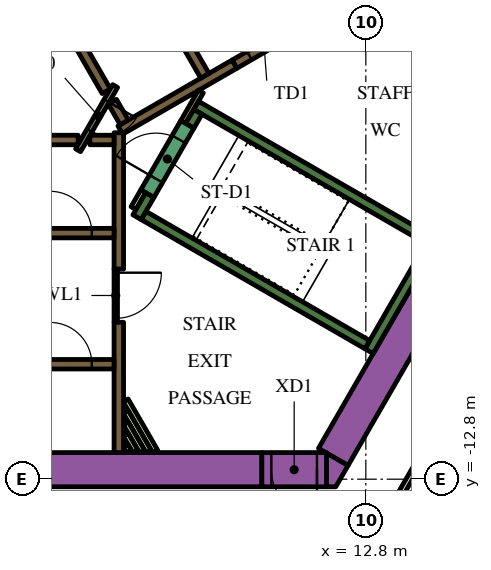
"""IFC4 building model, lengths in metres.
Left out: names, types, materials, properties, quantities, classifications, styles, units other than length and angle.
Written with IfcOpenShell. Run it as: python <this file> out.ifc"""

import sys

from ifc_helpers import new_model, si_unit, direction, frame, frame_2d, origin, place, context, subcontext, project, spatial, polyline, rectangle, outline, extrude, element, fill, save


model = new_model("IFC4")
c1 = context("Model", 3, precision=1e-05, world=origin(), true_north=direction((0.0, 1.0)))
c2 = subcontext(c1, "Body", "Model", "MODEL_VIEW")
j1 = project(units=[si_unit("LENGTHUNIT", "METRE"), si_unit("PLANEANGLEUNIT", "RADIAN")], contexts=[c1])
p1 = place(None, origin())
s1 = spatial("IfcSite", under=j1, at=p1, CompositionType="ELEMENT")
p2 = place(p1, origin())
s2 = spatial("IfcBuilding", under=s1, at=p2, CompositionType="ELEMENT")
p3 = place(p2, frame((0.0, 0.0, 122.7)))
s3 = spatial("IfcBuildingStorey", under=s2, at=p3, CompositionType="ELEMENT", Elevation=122.7)
p4 = place(p3, frame((6.776, 13.364, 0.0), z_axis=(0.0, 0.0, 1.0), x_axis=(0.500004177138, -0.8660229921, 0.0)))
e1 = element("IfcWall", 1, at=p4, inside=s3, PredefinedType="SOLIDWALL", context=c2, shape_type="SweptSolid", body=[
    extrude(rectangle(XDim=20.204, YDim=0.9, at=frame_2d((10.102, 0.0))), origin(), (0.0, 0.0, 1.0), 3.9),
])
p5 = place(p3, frame((11.943, -12.214, 0.0), z_axis=(0.0, 0.0, 1.0), x_axis=(0.49998092645, 0.866036415623, 0.0)))
e2 = element("IfcWall", 2, at=p5, inside=s3, PredefinedType="SOLIDWALL", context=c2, shape_type="SweptSolid", body=[
    extrude(rectangle(XDim=8.83, YDim=0.9, at=frame_2d((4.415, 0.0))), origin(), (0.0, 0.0, 1.0), 3.9),
])
p6 = place(p3, origin())
e3 = element("IfcWall", 3, at=p6, inside=s3, PredefinedType="SOLIDWALL", context=c2, shape_type="SweptSolid", body=[
    extrude(outline(polyline([(12.009, -13.0), (11.764, -13.0), (11.764, -12.113), (12.332, -12.441), (12.009, -13.0)])), origin(), (0.0, 0.0, 1.0), 3.9),
])
p7 = place(p3, frame((-12.019, -12.55, 0.0), z_axis=(0.0, 0.0, 1.0), x_axis=(1.0, 0.0, 0.0)))
e4 = element("IfcWall", 4, at=p7, inside=s3, PredefinedType="SOLIDWALL", context=c2, shape_type="SweptSolid", body=[
    extrude(rectangle(XDim=22.083, YDim=0.9, at=frame_2d((11.042, 0.0))), origin(), (0.0, 0.0, 1.0), 3.9),
])
p8 = place(p3, frame((12.885, -9.431, 0.0), z_axis=(0.0, 0.0, 1.0), x_axis=(0.500020560727, 0.866013532718, 0.0)))
e5 = element("IfcWall", 5, at=p8, inside=s3, PredefinedType="SOLIDWALL", context=c2, shape_type="SweptSolid", body=[
    extrude(rectangle(XDim=3.45, YDim=0.25, at=frame_2d((1.725, 0.0))), origin(), (0.0, 0.0, 1.0), 3.9),
])
p9 = place(p3, frame((12.84, -9.261, 0.0), z_axis=(0.0, 0.0, 1.0), x_axis=(-0.866013990052, 0.500019768644, 0.0)))
e6 = element("IfcWall", 6, at=p9, inside=s3, PredefinedType="SOLIDWALL", context=c2, shape_type="SweptSolid", body=[
    extrude(rectangle(XDim=6.8, YDim=0.25, at=frame_2d((3.4, 0.0))), origin(), (0.0, 0.0, 1.0), 3.9),
])
p10 = place(p3, frame((6.78, -5.906, 0.0), z_axis=(0.0, 0.0, 1.0), x_axis=(0.500223362819, 0.865896406789, 0.0)))
e7 = element("IfcWall", 7, at=p10, inside=s3, PredefinedType="SOLIDWALL", context=c2, shape_type="SweptSolid", body=[
    extrude(rectangle(XDim=0.675, YDim=0.25, at=frame_2d((0.337, 0.0))), origin(), (0.0, 0.0, 1.0), 3.9),
])
p11 = place(p3, frame((8.334, -2.964, 0.0), z_axis=(0.0, 0.0, 1.0), x_axis=(0.866016039709, -0.500016218704, 0.0)))
e8 = element("IfcWall", 8, at=p11, inside=s3, PredefinedType="SOLIDWALL", context=c2, shape_type="SweptSolid", body=[
    extrude(rectangle(XDim=7.05, YDim=0.25, at=frame_2d((3.525, 0.0))), origin(), (0.0, 0.0, 1.0), 3.9),
])
p12 = place(p3, frame((8.168, -3.503, 0.0), z_axis=(0.0, 0.0, 1.0), x_axis=(0.49972245349, 0.866185586049, 0.0)))
e9 = element("IfcWall", 9, at=p12, inside=s3, PredefinedType="SOLIDWALL", context=c2, shape_type="SweptSolid", body=[
    extrude(rectangle(XDim=0.425, YDim=0.25, at=frame_2d((0.212, 0.0))), origin(), (0.0, 0.0, 1.0), 3.9),
])
p13 = place(p3, frame((-5.259, -3.875, 0.0), z_axis=(0.0, 0.0, 1.0), x_axis=(1.0, 0.0, 0.0)))
e10 = element("IfcWall", 10, at=p13, inside=s3, PredefinedType="SOLIDWALL", context=c2, shape_type="SweptSolid", body=[
    extrude(rectangle(XDim=10.489, YDim=0.25, at=frame_2d((5.244, 0.0))), origin(), (0.0, 0.0, 1.0), 3.9),
])
p14 = place(p3, frame((6.3, -7.27, 0.0), z_axis=(0.0, 0.0, 1.0), x_axis=(0.0, 1.0, 0.0)))
e11 = element("IfcWall", 11, at=p14, inside=s3, PredefinedType="SOLIDWALL", context=c2, shape_type="SweptSolid", body=[
    extrude(rectangle(XDim=3.586, YDim=0.25, at=frame_2d((1.793, 0.0))), origin(), (0.0, 0.0, 1.0), 3.9),
])
p15 = place(p3, frame((6.3, -12.1, 0.0), z_axis=(0.0, 0.0, 1.0), x_axis=(0.0, 1.0, 0.0)))
e12 = element("IfcWall", 12, at=p15, inside=s3, PredefinedType="SOLIDWALL", context=c2, shape_type="SweptSolid", body=[
    extrude(rectangle(XDim=3.428, YDim=0.25, at=frame_2d((1.714, 0.0))), origin(), (0.0, 0.0, 1.0), 3.9),
])
p16 = place(p3, frame((5.538, -3.875, 0.0), z_axis=(0.0, 0.0, 1.0), x_axis=(1.0, 0.0, 0.0)))
e13 = element("IfcWall", 13, at=p16, inside=s3, PredefinedType="SOLIDWALL", context=c2, shape_type="SweptSolid", body=[
    extrude(rectangle(XDim=0.637, YDim=0.25, at=frame_2d((0.318, 0.0))), origin(), (0.0, 0.0, 1.0), 3.9),
])
p17 = place(p3, frame((9.346, -1.879, 0.0), z_axis=(0.0, 0.0, 1.0), x_axis=(-0.866048528039, -0.499959945477, 0.0)))
e14 = element("IfcWall", 14, at=p17, inside=s3, PredefinedType="SOLIDWALL", context=c2, shape_type="SweptSolid", body=[
    extrude(rectangle(XDim=3.47, YDim=0.25, at=frame_2d((1.735, 0.0))), origin(), (0.0, 0.0, 1.0), 3.9),
])
p18 = place(p3, frame((6.13, -2.867, 0.0), z_axis=(0.0, 0.0, 1.0), x_axis=(0.500160776593, -0.865932559475, 0.0)))
e15 = element("IfcWall", 15, at=p18, inside=s3, PredefinedType="SOLIDWALL", context=c2, shape_type="SweptSolid", body=[
    extrude(rectangle(XDim=0.627, YDim=0.25, at=frame_2d((0.313, 0.0))), origin(), (0.0, 0.0, 1.0), 3.9),
])
p19 = place(p3, frame((5.97, -2.591, 0.0), z_axis=(0.0, 0.0, 1.0), x_axis=(-0.499994469932, 0.866028596547, 0.0)))
e16 = element("IfcWall", 16, at=p19, inside=s3, PredefinedType="SOLIDWALL", context=c2, shape_type="SweptSolid", body=[
    extrude(rectangle(XDim=10.488, YDim=0.25, at=frame_2d((5.244, 0.0))), origin(), (0.0, 0.0, 1.0), 3.9),
])
p20 = place(p3, frame((6.48, -10.726, 0.0), z_axis=(0.0, 0.0, 1.0), x_axis=(0.500017819788, -0.86601511528, 0.0)))
e17 = element("IfcWall", 17, at=p20, inside=s3, PredefinedType="PARTITIONING", context=c2, shape_type="SweptSolid", body=[
    extrude(rectangle(XDim=1.55, YDim=0.15, at=frame_2d((0.775, 0.0))), origin(), (0.0, 0.0, 1.0), 2.75),
])
p21 = place(p3, frame((6.48, -11.026, 0.0), z_axis=(0.0, 0.0, 1.0), x_axis=(0.49995654735, -0.86605048973, 0.0)))
e18 = element("IfcWall", 18, at=p21, inside=s3, PredefinedType="PARTITIONING", context=c2, shape_type="SweptSolid", body=[
    extrude(rectangle(XDim=1.204, YDim=0.15, at=frame_2d((0.602, 0.0))), origin(), (0.0, 0.0, 1.0), 2.75),
])
p22 = place(p3, frame((6.48, -11.326, 0.0), z_axis=(0.0, 0.0, 1.0), x_axis=(0.500059337743, -0.865991142412, 0.0)))
e19 = element("IfcWall", 19, at=p22, inside=s3, PredefinedType="PARTITIONING", context=c2, shape_type="SweptSolid", body=[
    extrude(rectangle(XDim=0.857, YDim=0.15, at=frame_2d((0.429, 0.0))), origin(), (0.0, 0.0, 1.0), 2.75),
])
p23 = place(p3, frame((6.48, -11.626, 0.0), z_axis=(0.0, 0.0, 1.0), x_axis=(0.500301480982, -0.865851273677, 0.0)))
e20 = element("IfcWall", 20, at=p23, inside=s3, PredefinedType="PARTITIONING", context=c2, shape_type="SweptSolid", body=[
    extrude(rectangle(XDim=0.511, YDim=0.15, at=frame_2d((0.255, 0.0))), origin(), (0.0, 0.0, 1.0), 2.75),
])
p24 = place(p3, frame((6.48, -11.926, 0.0), z_axis=(0.0, 0.0, 1.0), x_axis=(0.500450775723, -0.86576499183, 0.0)))
e21 = element("IfcWall", 21, at=p24, inside=s3, PredefinedType="PARTITIONING", context=c2, shape_type="SweptSolid", body=[
    extrude(rectangle(XDim=0.164, YDim=0.15, at=frame_2d((0.082, 0.0))), origin(), (0.0, 0.0, 1.0), 2.75),
])
p25 = place(p3, frame((6.945, -5.222, 0.0), z_axis=(0.0, 0.0, 1.0), x_axis=(-0.499818422106, -0.866130212453, 0.0)))
e22 = element("IfcWall", 22, at=p25, inside=s3, PredefinedType="PARTITIONING", context=c2, shape_type="SweptSolid", body=[
    extrude(rectangle(XDim=0.514, YDim=0.15, at=frame_2d((0.257, 0.0))), origin(), (0.0, 0.0, 1.0), 2.75),
])
p26 = place(p3, frame((8.459, -2.599, 0.0), z_axis=(0.0, 0.0, 1.0), x_axis=(-0.500041054325, -0.866001699761, 0.0)))
e23 = element("IfcWall", 23, at=p26, inside=s3, PredefinedType="PARTITIONING", context=c2, shape_type="SweptSolid", body=[
    extrude(rectangle(XDim=0.929, YDim=0.15, at=frame_2d((0.464, 0.0))), origin(), (0.0, 0.0, 1.0), 3.9),
])
p27 = place(p3, frame((-6.175, -9.775, 0.0), z_axis=(0.0, 0.0, 1.0), x_axis=(1.0, 0.0, 0.0)))
e24 = element("IfcWall", 24, at=p27, inside=s3, PredefinedType="SOLIDWALL", context=c2, shape_type="SweptSolid", body=[
    extrude(rectangle(XDim=12.35, YDim=0.25, at=frame_2d((6.175, 0.0))), origin(), (0.0, 0.0, 1.0), 3.9),
])
p28 = place(p27, frame((0.585, 0.0, 0.0)))
e25 = element("IfcOpeningElement", 25, at=p28, cuts=e24, PredefinedType="OPENING", context=c2, shape_type="SweptSolid", body=[
    extrude(rectangle(XDim=1.1, YDim=2.1, at=frame_2d((0.55, 1.05))), frame((0.0, 0.135, 0.0), z_axis=(0.0, -1.0, 0.0), x_axis=(1.0, 0.0, 0.0)), (0.0, 0.0, 1.0), 0.27),
])
p29 = place(p27, frame((3.105, 0.0, 0.0)))
e26 = element("IfcOpeningElement", 26, at=p29, cuts=e24, PredefinedType="OPENING", context=c2, shape_type="SweptSolid", body=[
    extrude(rectangle(XDim=1.1, YDim=2.1, at=frame_2d((0.55, 1.05))), frame((0.0, 0.135, 0.0), z_axis=(0.0, -1.0, 0.0), x_axis=(1.0, 0.0, 0.0)), (0.0, 0.0, 1.0), 0.27),
])
p30 = place(p27, frame((5.625, 0.0, 0.0)))
e27 = element("IfcOpeningElement", 27, at=p30, cuts=e24, PredefinedType="OPENING", context=c2, shape_type="SweptSolid", body=[
    extrude(rectangle(XDim=1.1, YDim=2.1, at=frame_2d((0.55, 1.05))), frame((0.0, 0.135, 0.0), z_axis=(0.0, -1.0, 0.0), x_axis=(1.0, 0.0, 0.0)), (0.0, 0.0, 1.0), 0.27),
])
p31 = place(p27, frame((8.145, 0.0, 0.0)))
e28 = element("IfcOpeningElement", 28, at=p31, cuts=e24, PredefinedType="OPENING", context=c2, shape_type="SweptSolid", body=[
    extrude(rectangle(XDim=1.1, YDim=2.1, at=frame_2d((0.55, 1.05))), frame((0.0, 0.135, 0.0), z_axis=(0.0, -1.0, 0.0), x_axis=(1.0, 0.0, 0.0)), (0.0, 0.0, 1.0), 0.27),
])
p32 = place(p27, frame((10.665, 0.0, 0.0)))
e29 = element("IfcOpeningElement", 29, at=p32, cuts=e24, PredefinedType="OPENING", context=c2, shape_type="SweptSolid", body=[
    extrude(rectangle(XDim=1.1, YDim=2.1, at=frame_2d((0.55, 1.05))), frame((0.0, 0.135, 0.0), z_axis=(0.0, -1.0, 0.0), x_axis=(1.0, 0.0, 0.0)), (0.0, 0.0, 1.0), 0.27),
])
p33 = place(p3, frame((-6.175, -6.325, 0.0), z_axis=(0.0, 0.0, 1.0), x_axis=(1.0, 0.0, 0.0)))
e30 = element("IfcWall", 30, at=p33, inside=s3, PredefinedType="SOLIDWALL", context=c2, shape_type="SweptSolid", body=[
    extrude(rectangle(XDim=12.35, YDim=0.25, at=frame_2d((6.175, 0.0))), origin(), (0.0, 0.0, 1.0), 3.9),
])
p34 = place(p33, frame((3.205, 0.0, 0.0)))
e31 = element("IfcOpeningElement", 31, at=p34, cuts=e30, PredefinedType="OPENING", context=c2, shape_type="SweptSolid", body=[
    extrude(rectangle(XDim=0.9, YDim=2.1, at=frame_2d((0.45, 1.05))), frame((0.0, 0.135, 0.0), z_axis=(0.0, -1.0, 0.0), x_axis=(1.0, 0.0, 0.0)), (0.0, 0.0, 1.0), 0.27),
])
p35 = place(p33, frame((8.145, 0.0, 0.0)))
e32 = element("IfcOpeningElement", 32, at=p35, cuts=e30, PredefinedType="OPENING", context=c2, shape_type="SweptSolid", body=[
    extrude(rectangle(XDim=1.1, YDim=2.1, at=frame_2d((0.55, 1.05))), frame((0.0, 0.135, 0.0), z_axis=(0.0, -1.0, 0.0), x_axis=(1.0, 0.0, 0.0)), (0.0, 0.0, 1.0), 0.27),
])
p36 = place(p33, frame((10.665, 0.0, 0.0)))
e33 = element("IfcOpeningElement", 33, at=p36, cuts=e30, PredefinedType="OPENING", context=c2, shape_type="SweptSolid", body=[
    extrude(rectangle(XDim=1.1, YDim=2.1, at=frame_2d((0.55, 1.05))), frame((0.0, 0.135, 0.0), z_axis=(0.0, -1.0, 0.0), x_axis=(1.0, 0.0, 0.0)), (0.0, 0.0, 1.0), 0.27),
])
p37 = place(p3, frame((8.565, -2.185, 0.0), z_axis=(0.0, 0.0, 1.0), x_axis=(-0.499997954832, 0.866026584559, 0.0)))
e34 = element("IfcWall", 34, at=p37, inside=s3, PredefinedType="SOLIDWALL", context=c2, shape_type="SweptSolid", body=[
    extrude(rectangle(XDim=12.35, YDim=0.25, at=frame_2d((6.175, 0.0))), origin(), (0.0, 0.0, 1.0), 3.9),
])
p38 = place(p37, frame((5.725, 0.0, 0.0)))
e35 = element("IfcOpeningElement", 35, at=p38, cuts=e34, PredefinedType="OPENING", context=c2, shape_type="SweptSolid", body=[
    extrude(rectangle(XDim=0.9, YDim=2.1, at=frame_2d((0.45, 1.05))), frame((0.0, 0.135, 0.0), z_axis=(0.0, -1.0, 0.0), x_axis=(1.0, 0.0, 0.0)), (0.0, 0.0, 1.0), 0.27),
])
p39 = place(p3, frame((7.053, -5.284, 0.0), z_axis=(0.0, 0.0, 1.0), x_axis=(0.500078061341, 0.865980330357, 0.0)))
e36 = element("IfcWall", 36, at=p39, inside=s3, PredefinedType="SOLIDWALL", context=c2, shape_type="SweptSolid", body=[
    extrude(rectangle(XDim=2.1, YDim=0.4, at=frame_2d((1.05, 0.0))), origin(), (0.0, 0.0, 1.0), 3.9),
])
p40 = place(p39, frame((0.45, 0.0, 0.0)))
e37 = element("IfcOpeningElement", 37, at=p40, cuts=e36, PredefinedType="OPENING", context=c2, shape_type="SweptSolid", body=[
    extrude(rectangle(XDim=1.2, YDim=2.1, at=frame_2d((0.6, 1.05))), frame((0.0, 0.21, 0.0), z_axis=(0.0, -1.0, 0.0), x_axis=(1.0, 0.0, 0.0)), (0.0, 0.0, 1.0), 0.42),
])
p41 = place(p3, frame((9.346, -1.879, 0.0), z_axis=(0.0, 0.0, 1.0), x_axis=(0.866047807691, 0.499961193289, 0.0)))
e38 = element("IfcWall", 38, at=p41, inside=s3, PredefinedType="SOLIDWALL", context=c2, shape_type="SweptSolid", body=[
    extrude(rectangle(XDim=1.8, YDim=0.25, at=frame_2d((0.9, 0.0))), origin(), (0.0, 0.0, 1.0), 3.9),
])
p42 = place(p41, frame((0.45, 0.0, 0.0)))
e39 = element("IfcOpeningElement", 39, at=p42, cuts=e38, PredefinedType="OPENING", context=c2, shape_type="SweptSolid", body=[
    extrude(rectangle(XDim=0.9, YDim=2.1, at=frame_2d((0.45, 1.05))), frame((0.0, 0.135, 0.0), z_axis=(0.0, -1.0, 0.0), x_axis=(1.0, 0.0, 0.0)), (0.0, 0.0, 1.0), 0.27),
])
p43 = place(p3, frame((6.203, -2.456, 0.0), z_axis=(0.0, 0.0, 1.0), x_axis=(-0.500043961785, -0.866000020948, 0.0)))
e40 = element("IfcWall", 40, at=p43, inside=s3, PredefinedType="PARTITIONING", context=c2, shape_type="SweptSolid", body=[
    extrude(rectangle(XDim=1.95, YDim=0.15, at=frame_2d((0.975, 0.0))), origin(), (0.0, 0.0, 1.0), 3.9),
])
p44 = place(p43, frame((0.45, 0.0, 0.0)))
e41 = element("IfcOpeningElement", 41, at=p44, cuts=e40, PredefinedType="OPENING", context=c2, shape_type="SweptSolid", body=[
    extrude(rectangle(XDim=0.9, YDim=2.1, at=frame_2d((0.45, 1.05))), frame((0.0, 0.085, 0.0), z_axis=(0.0, -1.0, 0.0), x_axis=(1.0, 0.0, 0.0)), (0.0, 0.0, 1.0), 0.17),
])
p45 = place(p3, frame((6.22, -7.266, 0.0), z_axis=(0.0, 0.0, 1.0), x_axis=(0.0, -1.0, 0.0)))
e42 = element("IfcWall", 42, at=p45, inside=s3, PredefinedType="PARTITIONING", context=c2, shape_type="SweptSolid", body=[
    extrude(rectangle(XDim=1.4, YDim=0.09, at=frame_2d((0.7, 0.0))), origin(), (0.0, 0.0, 1.0), 2.75),
])
p46 = place(p45, frame((0.1, 0.0, 0.0)))
e43 = element("IfcOpeningElement", 43, at=p46, cuts=e42, PredefinedType="OPENING", context=c2, shape_type="SweptSolid", body=[
    extrude(rectangle(XDim=1.2, YDim=2.1, at=frame_2d((0.6, 1.05))), frame((0.0, 0.055, 0.0), z_axis=(0.0, -1.0, 0.0), x_axis=(1.0, 0.0, 0.0)), (0.0, 0.0, 1.0), 0.11),
])
p47 = place(p3, frame((11.764, -12.55, 0.0), z_axis=(0.0, 0.0, 1.0), x_axis=(-1.0, 0.0, 0.0)))
e44 = element("IfcWall", 44, at=p47, inside=s3, PredefinedType="SOLIDWALL", context=c2, shape_type="SweptSolid", body=[
    extrude(rectangle(XDim=1.7, YDim=0.9, at=frame_2d((0.85, 0.0))), origin(), (0.0, 0.0, 1.0), 3.9),
])
p48 = place(p47, frame((0.25, 0.0, 0.0)))
e45 = element("IfcOpeningElement", 45, at=p48, cuts=e44, PredefinedType="OPENING", context=c2, shape_type="SweptSolid", body=[
    extrude(rectangle(XDim=1.2, YDim=2.1, at=frame_2d((0.6, 1.05))), frame((0.0, 0.46, 0.0), z_axis=(0.0, -1.0, 0.0), x_axis=(1.0, 0.0, 0.0)), (0.0, 0.0, 1.0), 0.92),
])
p49 = place(p3, frame((6.163, 18.475, 0.0), z_axis=(0.0, 0.0, 1.0), x_axis=(0.500001317485, -0.866024643133, 0.0)))
e46 = element("IfcWall", 46, at=p49, inside=s3, PredefinedType="PARTITIONING", context=c2, shape_type="SweptSolid", body=[
    extrude(rectangle(XDim=25.767, YDim=0.15, at=frame_2d((12.883, 0.0))), origin(), (0.0, 0.0, 1.0), 2.75),
])
p50 = place(p49, frame((19.306, 0.0, 0.0)))
e47 = element("IfcOpeningElement", 47, at=p50, cuts=e46, PredefinedType="OPENING", context=c2, shape_type="SweptSolid", body=[
    extrude(rectangle(XDim=1.0, YDim=2.1, at=frame_2d((0.5, 1.05))), frame((0.0, 0.085, 0.0), z_axis=(0.0, -1.0, 0.0), x_axis=(1.0, 0.0, 0.0)), (0.0, 0.0, 1.0), 0.17),
])
p51 = place(p49, frame((17.999, 0.0, 0.0)))
e48 = element("IfcOpeningElement", 48, at=p51, cuts=e46, PredefinedType="OPENING", context=c2, shape_type="SweptSolid", body=[
    extrude(rectangle(XDim=1.0, YDim=2.1, at=frame_2d((0.5, 1.05))), frame((0.0, 0.085, 0.0), z_axis=(0.0, -1.0, 0.0), x_axis=(1.0, 0.0, 0.0)), (0.0, 0.0, 1.0), 0.17),
])
p52 = place(p49, frame((0.596, 0.0, 0.0)))
e49 = element("IfcOpeningElement", 49, at=p52, cuts=e46, PredefinedType="OPENING", context=c2, shape_type="SweptSolid", body=[
    extrude(rectangle(XDim=1.0, YDim=2.1, at=frame_2d((0.5, 1.05))), frame((0.0, 0.085, 0.0), z_axis=(0.0, -1.0, 0.0), x_axis=(1.0, 0.0, 0.0)), (0.0, 0.0, 1.0), 0.17),
])
p53 = place(p3, frame((15.587, -9.952, 0.0), z_axis=(0.0, 0.0, 1.0), x_axis=(-0.500016618951, -0.866015808616, 0.0)))
e50 = element("IfcWall", 50, at=p53, inside=s3, PredefinedType="PARTITIONING", context=c2, shape_type="SweptSolid", body=[
    extrude(rectangle(XDim=5.268, YDim=0.15, at=frame_2d((2.634, 0.0))), origin(), (0.0, 0.0, 1.0), 2.75),
])
p54 = place(p53, frame((4.088, 0.0, 0.0)))
e51 = element("IfcOpeningElement", 51, at=p54, cuts=e50, PredefinedType="OPENING", context=c2, shape_type="SweptSolid", body=[
    extrude(rectangle(XDim=1.0, YDim=2.1, at=frame_2d((0.5, 1.05))), frame((0.0, 0.085, 0.0), z_axis=(0.0, -1.0, 0.0), x_axis=(1.0, 0.0, 0.0)), (0.0, 0.0, 1.0), 0.17),
])
p55 = place(p32, origin())
e52 = element("IfcDoor", 52, at=p55, inside=s3, OperationType="DOUBLE_DOOR_SLIDING", PredefinedType="DOOR", context=c2, shape_type="SweptSolid", body=[
    extrude(rectangle(XDim=1.1, YDim=2.1, at=frame_2d((0.55, 1.05))), frame((0.0, 0.025, 0.0), z_axis=(0.0, -1.0, 0.0), x_axis=(1.0, 0.0, 0.0)), (0.0, 0.0, 1.0), 0.05),
])
fill(e29, e52)
p56 = place(p36, origin())
e53 = element("IfcDoor", 53, at=p56, inside=s3, OperationType="DOUBLE_DOOR_SLIDING", PredefinedType="DOOR", context=c2, shape_type="SweptSolid", body=[
    extrude(rectangle(XDim=1.1, YDim=2.1, at=frame_2d((0.55, 1.05))), frame((0.0, 0.025, 0.0), z_axis=(0.0, -1.0, 0.0), x_axis=(1.0, 0.0, 0.0)), (0.0, 0.0, 1.0), 0.05),
])
fill(e33, e53)
p57 = place(p40, origin())
e54 = element("IfcDoor", 54, at=p57, inside=s3, OperationType="SINGLE_SWING_LEFT", PredefinedType="DOOR", context=c2, shape_type="SweptSolid", body=[
    extrude(rectangle(XDim=1.2, YDim=2.1, at=frame_2d((0.6, 1.05))), frame((0.0, 0.025, 0.0), z_axis=(0.0, -1.0, 0.0), x_axis=(1.0, 0.0, 0.0)), (0.0, 0.0, 1.0), 0.05),
])
fill(e37, e54)
p58 = place(p42, origin())
e55 = element("IfcDoor", 55, at=p58, inside=s3, OperationType="SINGLE_SWING_LEFT", PredefinedType="DOOR", context=c2, shape_type="SweptSolid", body=[
    extrude(rectangle(XDim=0.9, YDim=2.1, at=frame_2d((0.45, 1.05))), frame((0.0, 0.025, 0.0), z_axis=(0.0, -1.0, 0.0), x_axis=(1.0, 0.0, 0.0)), (0.0, 0.0, 1.0), 0.05),
])
fill(e39, e55)
p59 = place(p44, origin())
e56 = element("IfcDoor", 56, at=p59, inside=s3, OperationType="SINGLE_SWING_LEFT", PredefinedType="DOOR", context=c2, shape_type="SweptSolid", body=[
    extrude(rectangle(XDim=0.9, YDim=2.1, at=frame_2d((0.45, 1.05))), frame((0.0, 0.025, 0.0), z_axis=(0.0, -1.0, 0.0), x_axis=(1.0, 0.0, 0.0)), (0.0, 0.0, 1.0), 0.05),
])
fill(e41, e56)
p60 = place(p46, origin())
e57 = element("IfcDoor", 57, at=p60, inside=s3, OperationType="SINGLE_SWING_LEFT", PredefinedType="DOOR", context=c2, shape_type="SweptSolid", body=[
    extrude(rectangle(XDim=1.2, YDim=2.1, at=frame_2d((0.6, 1.05))), frame((0.0, 0.025, 0.0), z_axis=(0.0, -1.0, 0.0), x_axis=(1.0, 0.0, 0.0)), (0.0, 0.0, 1.0), 0.05),
])
fill(e43, e57)
p61 = place(p48, origin())
e58 = element("IfcDoor", 58, at=p61, inside=s3, OperationType="SINGLE_SWING_LEFT", PredefinedType="DOOR", context=c2, shape_type="SweptSolid", body=[
    extrude(rectangle(XDim=1.2, YDim=2.1, at=frame_2d((0.6, 1.05))), frame((0.0, 0.025, 0.0), z_axis=(0.0, -1.0, 0.0), x_axis=(1.0, 0.0, 0.0)), (0.0, 0.0, 1.0), 0.05),
])
fill(e45, e58)
save(model, sys.argv[1])
